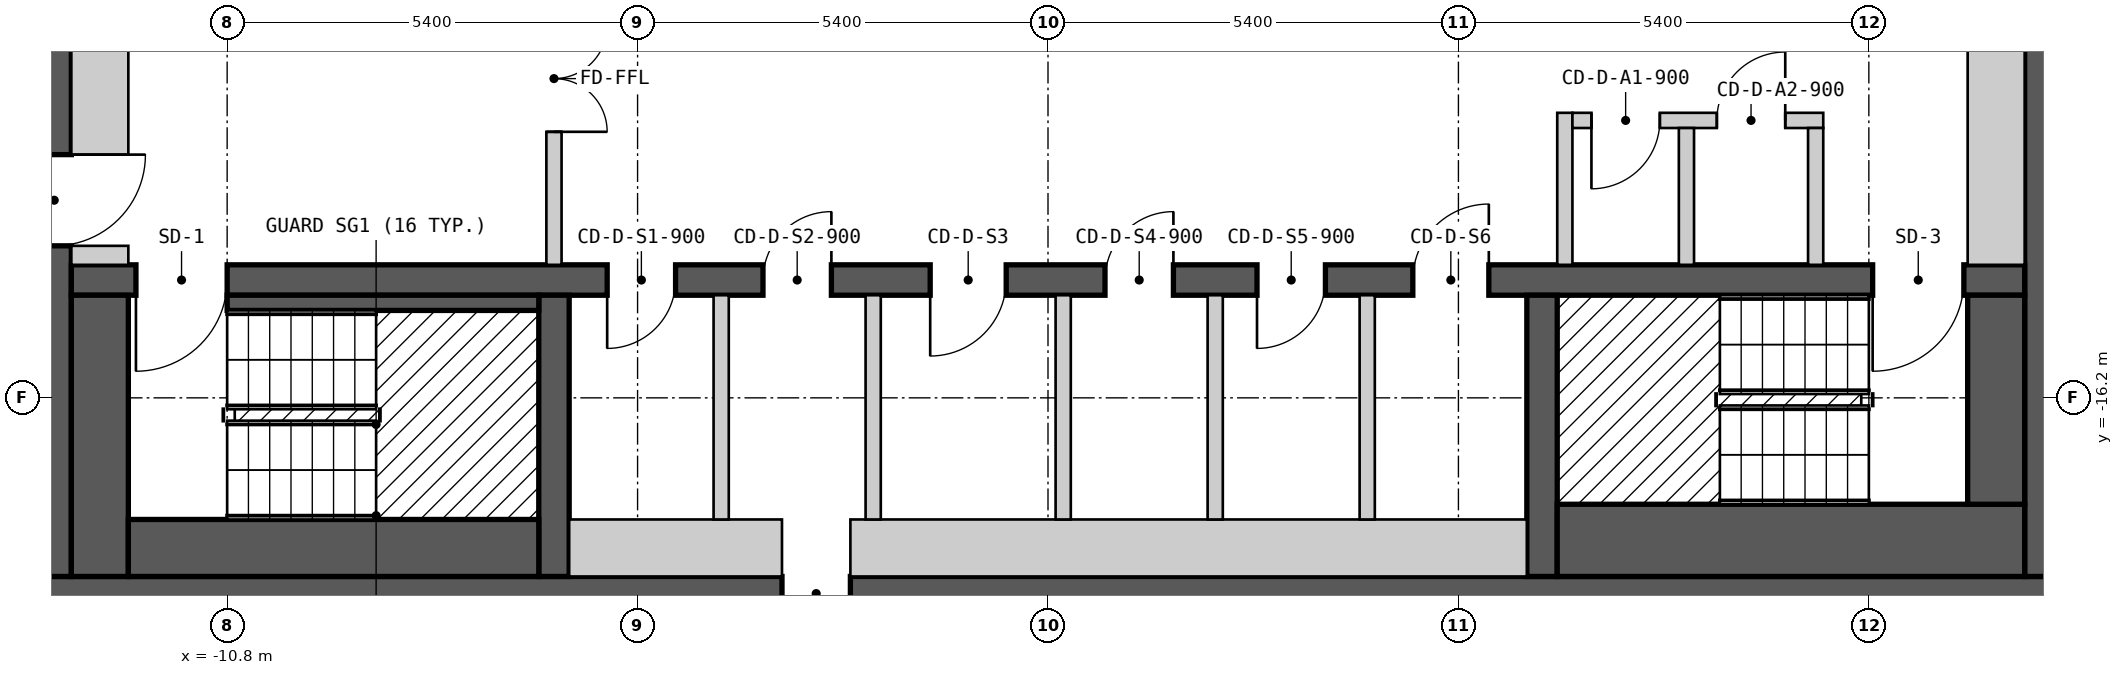
"""IFC4 building model, lengths in metres.
Left out: names, types, materials, properties, quantities, classifications, styles, units other than length and angle.
Written with IfcOpenShell. Run it as: python <this file> out.ifc"""

import sys

from ifc_helpers import new_model, si_unit, direction, frame, frame_2d, origin, place, context, subcontext, project, spatial, polyline, rectangle, outline, extrude, element, fill, save


model = new_model("IFC4")
c1 = context("Model", 3, precision=1e-05, world=origin(), true_north=direction((0.0, 1.0)))
c2 = subcontext(c1, "Body", "Model", "MODEL_VIEW")
j1 = project(units=[si_unit("LENGTHUNIT", "METRE"), si_unit("PLANEANGLEUNIT", "RADIAN")], contexts=[c1])
p1 = place(None, origin())
s1 = spatial("IfcSite", under=j1, at=p1, CompositionType="ELEMENT")
p2 = place(p1, origin())
s2 = spatial("IfcBuilding", under=s1, at=p2, CompositionType="ELEMENT")
p3 = place(p2, frame((0.0, 0.0, 229.8)))
s3 = spatial("IfcBuildingStorey", under=s2, at=p3, CompositionType="ELEMENT", Elevation=229.8)
p4 = place(p3, frame((-13.3, -18.775, 0.0), z_axis=(0.0, 0.0, 1.0), x_axis=(1.0, 0.0, 0.0)))
e1 = element("IfcWall", 1, at=p4, inside=s3, PredefinedType="SHEAR", context=c2, shape_type="SweptSolid", body=[
    extrude(rectangle(XDim=26.6, YDim=0.45, at=frame_2d((13.3, 0.0))), origin(), (0.0, 0.0, 1.0), 2.7),
])
p5 = place(p4, frame((9.8, 0.0, 0.0)))
e2 = element("IfcOpeningElement", 2, at=p5, cuts=e1, PredefinedType="OPENING", context=c2, shape_type="SweptSolid", body=[
    extrude(rectangle(XDim=0.9, YDim=2.1, at=frame_2d((0.45, 1.05))), frame((0.0, 0.235, 0.0), z_axis=(0.0, -1.0, 0.0), x_axis=(1.0, 0.0, 0.0)), (0.0, 0.0, 1.0), 0.47),
])
p6 = place(p3, frame((-13.075, -18.55, 0.0), z_axis=(0.0, 0.0, 1.0), x_axis=(0.0, 1.0, 0.0)))
e3 = element("IfcWall", 3, at=p6, inside=s3, PredefinedType="SHEAR", context=c2, shape_type="SweptSolid", body=[
    extrude(rectangle(XDim=13.1, YDim=0.45, at=frame_2d((6.55, 0.0))), origin(), (0.0, 0.0, 1.0), 2.7),
])
p7 = place(p6, frame((4.35, 0.0, 0.0)))
e4 = element("IfcOpeningElement", 4, at=p7, cuts=e3, PredefinedType="OPENING", context=c2, shape_type="SweptSolid", body=[
    extrude(rectangle(XDim=1.2, YDim=2.1, at=frame_2d((0.6, 1.05))), frame((0.0, 0.235, 0.0), z_axis=(0.0, -1.0, 0.0), x_axis=(1.0, 0.0, 0.0)), (0.0, 0.0, 1.0), 0.47),
])
p8 = place(p3, frame((13.075, -18.55, 0.0), z_axis=(0.0, 0.0, 1.0), x_axis=(0.0, 1.0, 0.0)))
e5 = element("IfcWall", 5, at=p8, inside=s3, PredefinedType="SHEAR", context=c2, shape_type="SweptSolid", body=[
    extrude(rectangle(XDim=13.1, YDim=0.45, at=frame_2d((6.55, 0.0))), origin(), (0.0, 0.0, 1.0), 2.7),
])
p9 = place(p3, frame((-12.85, -14.65, 0.0), z_axis=(0.0, 0.0, 1.0), x_axis=(1.0, 0.0, 0.0)))
e6 = element("IfcWall", 6, at=p9, inside=s3, PredefinedType="SHEAR", context=c2, shape_type="SweptSolid", body=[
    extrude(rectangle(XDim=25.7, YDim=0.4, at=frame_2d((12.85, 0.0))), origin(), (0.0, 0.0, 1.0), 2.7),
])
p10 = place(p9, frame((2.05, 0.0, 0.0), z_axis=(0.0, 0.0, 1.0), x_axis=(-1.0, 0.0, 0.0)))
e7 = element("IfcOpeningElement", 7, at=p10, cuts=e6, PredefinedType="OPENING", context=c2, shape_type="SweptSolid", body=[
    extrude(rectangle(XDim=1.2, YDim=2.1, at=frame_2d((0.6, 1.05))), frame((0.0, 0.21, 0.0), z_axis=(0.0, -1.0, 0.0), x_axis=(1.0, 0.0, 0.0)), (0.0, 0.0, 1.0), 0.42),
])
p11 = place(p9, frame((24.9, 0.0, 0.0), z_axis=(0.0, 0.0, 1.0), x_axis=(-1.0, 0.0, 0.0)))
e8 = element("IfcOpeningElement", 8, at=p11, cuts=e6, PredefinedType="OPENING", context=c2, shape_type="SweptSolid", body=[
    extrude(rectangle(XDim=1.2, YDim=2.1, at=frame_2d((0.6, 1.05))), frame((0.0, 0.21, 0.0), z_axis=(0.0, -1.0, 0.0), x_axis=(1.0, 0.0, 0.0)), (0.0, 0.0, 1.0), 0.42),
])
p12 = place(p9, frame((7.95, 0.0, 0.0), z_axis=(0.0, 0.0, 1.0), x_axis=(-1.0, 0.0, 0.0)))
e9 = element("IfcOpeningElement", 9, at=p12, cuts=e6, PredefinedType="OPENING", context=c2, shape_type="SweptSolid", body=[
    extrude(rectangle(XDim=0.9, YDim=2.1, at=frame_2d((0.45, 1.05))), frame((0.0, 0.21, 0.0), z_axis=(0.0, -1.0, 0.0), x_axis=(1.0, 0.0, 0.0)), (0.0, 0.0, 1.0), 0.42),
])
p13 = place(p9, frame((10.0, 0.0, 0.0), z_axis=(0.0, 0.0, 1.0), x_axis=(-1.0, 0.0, 0.0)))
e10 = element("IfcOpeningElement", 10, at=p13, cuts=e6, PredefinedType="OPENING", context=c2, shape_type="SweptSolid", body=[
    extrude(rectangle(XDim=0.9, YDim=2.1, at=frame_2d((0.45, 1.05))), frame((0.0, 0.21, 0.0), z_axis=(0.0, -1.0, 0.0), x_axis=(1.0, 0.0, 0.0)), (0.0, 0.0, 1.0), 0.42),
])
p14 = place(p9, frame((12.3, 0.0, 0.0), z_axis=(0.0, 0.0, 1.0), x_axis=(-1.0, 0.0, 0.0)))
e11 = element("IfcOpeningElement", 11, at=p14, cuts=e6, PredefinedType="OPENING", context=c2, shape_type="SweptSolid", body=[
    extrude(rectangle(XDim=1.0, YDim=2.1, at=frame_2d((0.5, 1.05))), frame((0.0, 0.21, 0.0), z_axis=(0.0, -1.0, 0.0), x_axis=(1.0, 0.0, 0.0)), (0.0, 0.0, 1.0), 0.42),
])
p15 = place(p9, frame((14.5, 0.0, 0.0), z_axis=(0.0, 0.0, 1.0), x_axis=(-1.0, 0.0, 0.0)))
e12 = element("IfcOpeningElement", 12, at=p15, cuts=e6, PredefinedType="OPENING", context=c2, shape_type="SweptSolid", body=[
    extrude(rectangle(XDim=0.9, YDim=2.1, at=frame_2d((0.45, 1.05))), frame((0.0, 0.21, 0.0), z_axis=(0.0, -1.0, 0.0), x_axis=(1.0, 0.0, 0.0)), (0.0, 0.0, 1.0), 0.42),
])
p16 = place(p9, frame((16.5, 0.0, 0.0), z_axis=(0.0, 0.0, 1.0), x_axis=(-1.0, 0.0, 0.0)))
e13 = element("IfcOpeningElement", 13, at=p16, cuts=e6, PredefinedType="OPENING", context=c2, shape_type="SweptSolid", body=[
    extrude(rectangle(XDim=0.9, YDim=2.1, at=frame_2d((0.45, 1.05))), frame((0.0, 0.21, 0.0), z_axis=(0.0, -1.0, 0.0), x_axis=(1.0, 0.0, 0.0)), (0.0, 0.0, 1.0), 0.42),
])
p17 = place(p9, frame((18.65, 0.0, 0.0), z_axis=(0.0, 0.0, 1.0), x_axis=(-1.0, 0.0, 0.0)))
e14 = element("IfcOpeningElement", 14, at=p17, cuts=e6, PredefinedType="OPENING", context=c2, shape_type="SweptSolid", body=[
    extrude(rectangle(XDim=1.0, YDim=2.1, at=frame_2d((0.5, 1.05))), frame((0.0, 0.21, 0.0), z_axis=(0.0, -1.0, 0.0), x_axis=(1.0, 0.0, 0.0)), (0.0, 0.0, 1.0), 0.42),
])
for number, where, z_axis, x_axis in (
    (15, (-6.5, -18.55, 0.0), (0.0, 0.0, 1.0), (0.0, 1.0, 0.0)),
    (16, (6.5, -18.55, 0.0), (0.0, 0.0, 1.0), (0.0, 1.0, 0.0)),
):
    element("IfcWall", number, at=place(p3, frame(where, z_axis=z_axis, x_axis=x_axis)), inside=s3, PredefinedType="SHEAR", context=c2, shape_type="SweptSolid", body=[
        extrude(rectangle(XDim=3.7, YDim=0.4, at=frame_2d((1.85, 0.0))), origin(), (0.0, 0.0, 1.0), 2.7),
    ])
p18 = place(p3, frame((-15.34, -18.37, 0.0), z_axis=(0.0, 0.0, 1.0), x_axis=(0.866022959057, -0.500004234368, 0.0)))
e17 = element("IfcWall", 17, at=p18, inside=s3, PredefinedType="SOLIDWALL", context=c2, shape_type="SweptSolid", body=[
    extrude(outline(polyline([(0.0, -0.15), (5.0, -0.15), (4.92, 0.15), (0.08, 0.15), (0.0, -0.15)])), origin(), (0.0, 0.0, 1.0), 2.7),
])
p19 = place(p18, frame((0.65, 0.0, 0.15)))
e18 = element("IfcOpeningElement", 18, at=p19, cuts=e17, PredefinedType="OPENING", context=c2, shape_type="SweptSolid", body=[
    extrude(rectangle(XDim=1.2, YDim=2.1, at=frame_2d((0.6, 1.05))), frame((0.0, 0.16, 0.0), z_axis=(0.0, -1.0, 0.0), x_axis=(1.0, 0.0, 0.0)), (0.0, 0.0, 1.0), 0.32),
])
p20 = place(p3, frame((11.01, -20.87, 0.0), z_axis=(0.0, 0.0, 1.0), x_axis=(0.866022959057, 0.500004234368, 0.0)))
e19 = element("IfcWall", 19, at=p20, inside=s3, PredefinedType="SOLIDWALL", context=c2, shape_type="SweptSolid", body=[
    extrude(outline(polyline([(0.0, -0.15), (5.0, -0.15), (4.92, 0.15), (0.08, 0.15), (0.0, -0.15)])), origin(), (0.0, 0.0, 1.0), 2.7),
])
p21 = place(p20, frame((0.65, 0.0, 0.15)))
e20 = element("IfcOpeningElement", 20, at=p21, cuts=e19, PredefinedType="OPENING", context=c2, shape_type="SweptSolid", body=[
    extrude(rectangle(XDim=1.2, YDim=2.1, at=frame_2d((0.6, 1.05))), frame((0.0, 0.16, 0.0), z_axis=(0.0, -1.0, 0.0), x_axis=(1.0, 0.0, 0.0)), (0.0, 0.0, 1.0), 0.32),
])
p22 = place(p3, frame((-12.475, -18.55, 0.0), z_axis=(0.0, 0.0, 1.0), x_axis=(0.0, 1.0, 0.0)))
e21 = element("IfcWall", 21, at=p22, inside=s3, PredefinedType="SOLIDWALL", context=c2, shape_type="SweptSolid", body=[
    extrude(rectangle(XDim=3.7, YDim=0.75, at=frame_2d((1.85, 0.0))), origin(), (0.0, 0.0, 1.0), 2.7),
])
p23 = place(p3, frame((-12.85, -14.325, 0.0), z_axis=(0.0, 0.0, 1.0), x_axis=(1.0, 0.0, 0.0)))
e22 = element("IfcWall", 22, at=p23, inside=s3, PredefinedType="PARTITIONING", context=c2, shape_type="SweptSolid", body=[
    extrude(rectangle(XDim=0.75, YDim=0.25, at=frame_2d((0.375, 0.0))), origin(), (0.0, 0.0, 1.0), 2.7),
])
p24 = place(p3, frame((-12.475, -13.0, 0.0), z_axis=(0.0, 0.0, 1.0), x_axis=(0.0, 1.0, 0.0)))
e23 = element("IfcWall", 23, at=p24, inside=s3, PredefinedType="PARTITIONING", context=c2, shape_type="SweptSolid", body=[
    extrude(rectangle(XDim=3.45, YDim=0.75, at=frame_2d((1.725, 0.0))), origin(), (0.0, 0.0, 1.0), 2.7),
])
p25 = place(p3, frame((-12.1, -18.175, 0.0), z_axis=(0.0, 0.0, 1.0), x_axis=(1.0, 0.0, 0.0)))
e24 = element("IfcWall", 24, at=p25, inside=s3, PredefinedType="SOLIDWALL", context=c2, shape_type="SweptSolid", body=[
    extrude(rectangle(XDim=5.4, YDim=0.75, at=frame_2d((2.7, 0.0))), origin(), (0.0, 0.0, 1.0), 2.7),
])
p26 = place(p3, frame((-10.8, -14.95, 0.0), z_axis=(0.0, 0.0, 1.0), x_axis=(1.0, 0.0, 0.0)))
e25 = element("IfcWall", 25, at=p26, inside=s3, PredefinedType="SOLIDWALL", context=c2, shape_type="SweptSolid", body=[
    extrude(rectangle(XDim=4.1, YDim=0.2, at=frame_2d((2.05, 0.0))), origin(), (0.0, 0.0, 1.0), 2.7),
])
p27 = place(p3, frame((-6.5, -14.45, 0.0), z_axis=(0.0, 0.0, 1.0), x_axis=(0.0, 1.0, 0.0)))
e26 = element("IfcWall", 26, at=p27, inside=s3, PredefinedType="PARTITIONING", context=c2, shape_type="SweptSolid", body=[
    extrude(rectangle(XDim=4.9, YDim=0.2, at=frame_2d((2.45, 0.0))), origin(), (0.0, 0.0, 1.0), 2.7),
])
p28 = place(p27, frame((3.15, 0.0, 0.0), z_axis=(0.0, 0.0, 1.0), x_axis=(-1.0, 0.0, 0.0)))
e27 = element("IfcOpeningElement", 27, at=p28, cuts=e26, PredefinedType="OPENING", context=c2, shape_type="SweptSolid", body=[
    extrude(rectangle(XDim=1.4, YDim=2.1, at=frame_2d((0.7, 1.05))), frame((0.0, 0.11, 0.0), z_axis=(0.0, -1.0, 0.0), x_axis=(1.0, 0.0, 0.0)), (0.0, 0.0, 1.0), 0.22),
])
p29 = place(p3, frame((-6.3, -18.175, 0.0), z_axis=(0.0, 0.0, 1.0), x_axis=(1.0, 0.0, 0.0)))
e28 = element("IfcWall", 28, at=p29, inside=s3, PredefinedType="PARTITIONING", context=c2, shape_type="SweptSolid", body=[
    extrude(rectangle(XDim=2.8, YDim=0.75, at=frame_2d((1.4, 0.0))), origin(), (0.0, 0.0, 1.0), 2.7),
])
p30 = place(p3, frame((-4.3, -17.8, 0.0), z_axis=(0.0, 0.0, 1.0), x_axis=(0.0, 1.0, 0.0)))
e29 = element("IfcWall", 29, at=p30, inside=s3, PredefinedType="PARTITIONING", context=c2, shape_type="SweptSolid", body=[
    extrude(rectangle(XDim=2.95, YDim=0.2, at=frame_2d((1.475, 0.0))), origin(), (0.0, 0.0, 1.0), 2.7),
])
p31 = place(p3, frame((-2.6, -18.175, 0.0), z_axis=(0.0, 0.0, 1.0), x_axis=(1.0, 0.0, 0.0)))
e30 = element("IfcWall", 30, at=p31, inside=s3, PredefinedType="PARTITIONING", context=c2, shape_type="SweptSolid", body=[
    extrude(rectangle(XDim=8.9, YDim=0.75, at=frame_2d((4.45, 0.0))), origin(), (0.0, 0.0, 1.0), 2.7),
])
for number, where, z_axis, x_axis in (
    (31, (-2.3, -17.8, 0.0), (0.0, 0.0, 1.0), (0.0, 1.0, 0.0)),
    (32, (0.2, -17.8, 0.0), (0.0, 0.0, 1.0), (0.0, 1.0, 0.0)),
    (33, (2.2, -17.8, 0.0), (0.0, 0.0, 1.0), (0.0, 1.0, 0.0)),
    (34, (4.2, -17.8, 0.0), (0.0, 0.0, 1.0), (0.0, 1.0, 0.0)),
):
    element("IfcWall", number, at=place(p3, frame(where, z_axis=z_axis, x_axis=x_axis)), inside=s3, PredefinedType="PARTITIONING", context=c2, shape_type="SweptSolid", body=[
        extrude(rectangle(XDim=2.95, YDim=0.2, at=frame_2d((1.475, 0.0))), origin(), (0.0, 0.0, 1.0), 2.7),
    ])
p32 = place(p3, frame((6.7, -18.075, 0.0), z_axis=(0.0, 0.0, 1.0), x_axis=(1.0, 0.0, 0.0)))
e35 = element("IfcWall", 35, at=p32, inside=s3, PredefinedType="SOLIDWALL", context=c2, shape_type="SweptSolid", body=[
    extrude(rectangle(XDim=6.15, YDim=0.95, at=frame_2d((3.075, 0.0))), origin(), (0.0, 0.0, 1.0), 2.7),
])
p33 = place(p3, frame((6.8, -14.45, 0.0), z_axis=(0.0, 0.0, 1.0), x_axis=(0.0, 1.0, 0.0)))
e36 = element("IfcWall", 36, at=p33, inside=s3, PredefinedType="PARTITIONING", context=c2, shape_type="SweptSolid", body=[
    extrude(rectangle(XDim=2.0, YDim=0.2, at=frame_2d((1.0, 0.0))), origin(), (0.0, 0.0, 1.0), 2.7),
])
p34 = place(p3, frame((6.9, -12.55, 0.0), z_axis=(0.0, 0.0, 1.0), x_axis=(1.0, 0.0, 0.0)))
e37 = element("IfcWall", 37, at=p34, inside=s3, PredefinedType="PARTITIONING", context=c2, shape_type="SweptSolid", body=[
    extrude(rectangle(XDim=3.3, YDim=0.2, at=frame_2d((1.65, 0.0))), origin(), (0.0, 0.0, 1.0), 2.7),
])
p35 = place(p34, frame((1.15, 0.0, 0.0), z_axis=(0.0, 0.0, 1.0), x_axis=(-1.0, 0.0, 0.0)))
e38 = element("IfcOpeningElement", 38, at=p35, cuts=e37, PredefinedType="OPENING", context=c2, shape_type="SweptSolid", body=[
    extrude(rectangle(XDim=0.9, YDim=2.1, at=frame_2d((0.45, 1.05))), frame((0.0, 0.11, 0.0), z_axis=(0.0, -1.0, 0.0), x_axis=(1.0, 0.0, 0.0)), (0.0, 0.0, 1.0), 0.22),
])
p36 = place(p34, frame((2.8, 0.0, 0.0), z_axis=(0.0, 0.0, 1.0), x_axis=(-1.0, 0.0, 0.0)))
e39 = element("IfcOpeningElement", 39, at=p36, cuts=e37, PredefinedType="OPENING", context=c2, shape_type="SweptSolid", body=[
    extrude(rectangle(XDim=0.9, YDim=2.1, at=frame_2d((0.45, 1.05))), frame((0.0, 0.11, 0.0), z_axis=(0.0, -1.0, 0.0), x_axis=(1.0, 0.0, 0.0)), (0.0, 0.0, 1.0), 0.22),
])
for number, where, z_axis, x_axis in (
    (40, (8.4, -14.45, 0.0), (0.0, 0.0, 1.0), (0.0, 1.0, 0.0)),
    (41, (10.1, -14.45, 0.0), (0.0, 0.0, 1.0), (0.0, 1.0, 0.0)),
):
    element("IfcWall", number, at=place(p3, frame(where, z_axis=z_axis, x_axis=x_axis)), inside=s3, PredefinedType="PARTITIONING", context=c2, shape_type="SweptSolid", body=[
        extrude(rectangle(XDim=1.8, YDim=0.2, at=frame_2d((0.9, 0.0))), origin(), (0.0, 0.0, 1.0), 2.7),
    ])
p37 = place(p3, frame((12.475, -17.6, 0.0), z_axis=(0.0, 0.0, 1.0), x_axis=(0.0, 1.0, 0.0)))
e42 = element("IfcWall", 42, at=p37, inside=s3, PredefinedType="SOLIDWALL", context=c2, shape_type="SweptSolid", body=[
    extrude(rectangle(XDim=2.75, YDim=0.75, at=frame_2d((1.375, 0.0))), origin(), (0.0, 0.0, 1.0), 2.7),
])
p38 = place(p3, frame((12.475, -14.45, 0.0), z_axis=(0.0, 0.0, 1.0), x_axis=(0.0, 1.0, 0.0)))
e43 = element("IfcWall", 43, at=p38, inside=s3, PredefinedType="PARTITIONING", context=c2, shape_type="SweptSolid", body=[
    extrude(rectangle(XDim=8.25, YDim=0.75, at=frame_2d((4.125, 0.0))), origin(), (0.0, 0.0, 1.0), 2.7),
])
p39 = place(p10, origin())
e44 = element("IfcDoor", 44, at=p39, inside=s3, OperationType="SINGLE_SWING_RIGHT", PredefinedType="DOOR", context=c2, shape_type="SweptSolid", body=[
    extrude(rectangle(XDim=1.2, YDim=2.1, at=frame_2d((0.6, 1.05))), frame((0.0, 0.025, 0.0), z_axis=(0.0, -1.0, 0.0), x_axis=(1.0, 0.0, 0.0)), (0.0, 0.0, 1.0), 0.05),
])
fill(e7, e44)
p40 = place(p11, origin())
e45 = element("IfcDoor", 45, at=p40, inside=s3, OperationType="SINGLE_SWING_RIGHT", PredefinedType="DOOR", context=c2, shape_type="SweptSolid", body=[
    extrude(rectangle(XDim=1.2, YDim=2.1, at=frame_2d((0.6, 1.05))), frame((0.0, 0.025, 0.0), z_axis=(0.0, -1.0, 0.0), x_axis=(1.0, 0.0, 0.0)), (0.0, 0.0, 1.0), 0.05),
])
fill(e8, e45)
p41 = place(p7, origin())
e46 = element("IfcDoor", 46, at=p41, inside=s3, OperationType="SINGLE_SWING_RIGHT", PredefinedType="DOOR", context=c2, shape_type="SweptSolid", body=[
    extrude(rectangle(XDim=1.2, YDim=2.1, at=frame_2d((0.6, 1.05))), frame((0.0, 0.025, 0.0), z_axis=(0.0, -1.0, 0.0), x_axis=(1.0, 0.0, 0.0)), (0.0, 0.0, 1.0), 0.05),
])
fill(e4, e46)
p42 = place(p28, origin())
e47 = element("IfcDoor", 47, at=p42, inside=s3, OperationType="DOUBLE_DOOR_SINGLE_SWING", PredefinedType="DOOR", context=c2, shape_type="SweptSolid", body=[
    extrude(rectangle(XDim=1.4, YDim=2.1, at=frame_2d((0.7, 1.05))), frame((0.0, 0.025, 0.0), z_axis=(0.0, -1.0, 0.0), x_axis=(1.0, 0.0, 0.0)), (0.0, 0.0, 1.0), 0.05),
])
fill(e27, e47)
p43 = place(p35, origin())
e48 = element("IfcDoor", 48, at=p43, inside=s3, OperationType="SINGLE_SWING_RIGHT", PredefinedType="DOOR", context=c2, shape_type="SweptSolid", body=[
    extrude(rectangle(XDim=0.9, YDim=2.1, at=frame_2d((0.45, 1.05))), frame((0.0, 0.025, 0.0), z_axis=(0.0, -1.0, 0.0), x_axis=(1.0, 0.0, 0.0)), (0.0, 0.0, 1.0), 0.05),
])
fill(e38, e48)
p44 = place(p36, origin())
e49 = element("IfcDoor", 49, at=p44, inside=s3, OperationType="SINGLE_SWING_LEFT", PredefinedType="DOOR", context=c2, shape_type="SweptSolid", body=[
    extrude(rectangle(XDim=0.9, YDim=2.1, at=frame_2d((0.45, 1.05))), frame((0.0, 0.025, 0.0), z_axis=(0.0, -1.0, 0.0), x_axis=(1.0, 0.0, 0.0)), (0.0, 0.0, 1.0), 0.05),
])
fill(e39, e49)
p45 = place(p12, origin())
e50 = element("IfcDoor", 50, at=p45, inside=s3, OperationType="SINGLE_SWING_RIGHT", PredefinedType="DOOR", context=c2, shape_type="SweptSolid", body=[
    extrude(rectangle(XDim=0.9, YDim=2.1, at=frame_2d((0.45, 1.05))), frame((0.0, 0.025, 0.0), z_axis=(0.0, -1.0, 0.0), x_axis=(1.0, 0.0, 0.0)), (0.0, 0.0, 1.0), 0.05),
])
fill(e9, e50)
p46 = place(p13, origin())
e51 = element("IfcDoor", 51, at=p46, inside=s3, OperationType="SINGLE_SWING_LEFT", PredefinedType="DOOR", context=c2, shape_type="SweptSolid", body=[
    extrude(rectangle(XDim=0.9, YDim=2.1, at=frame_2d((0.45, 1.05))), frame((0.0, 0.025, 0.0), z_axis=(0.0, -1.0, 0.0), x_axis=(1.0, 0.0, 0.0)), (0.0, 0.0, 1.0), 0.05),
])
fill(e10, e51)
p47 = place(p14, origin())
e52 = element("IfcDoor", 52, at=p47, inside=s3, OperationType="SINGLE_SWING_RIGHT", PredefinedType="DOOR", context=c2, shape_type="SweptSolid", body=[
    extrude(rectangle(XDim=1.0, YDim=2.1, at=frame_2d((0.5, 1.05))), frame((0.0, 0.025, 0.0), z_axis=(0.0, -1.0, 0.0), x_axis=(1.0, 0.0, 0.0)), (0.0, 0.0, 1.0), 0.05),
])
fill(e11, e52)
p48 = place(p15, origin())
e53 = element("IfcDoor", 53, at=p48, inside=s3, OperationType="SINGLE_SWING_LEFT", PredefinedType="DOOR", context=c2, shape_type="SweptSolid", body=[
    extrude(rectangle(XDim=0.9, YDim=2.1, at=frame_2d((0.45, 1.05))), frame((0.0, 0.025, 0.0), z_axis=(0.0, -1.0, 0.0), x_axis=(1.0, 0.0, 0.0)), (0.0, 0.0, 1.0), 0.05),
])
fill(e12, e53)
p49 = place(p16, origin())
e54 = element("IfcDoor", 54, at=p49, inside=s3, OperationType="SINGLE_SWING_RIGHT", PredefinedType="DOOR", context=c2, shape_type="SweptSolid", body=[
    extrude(rectangle(XDim=0.9, YDim=2.1, at=frame_2d((0.45, 1.05))), frame((0.0, 0.025, 0.0), z_axis=(0.0, -1.0, 0.0), x_axis=(1.0, 0.0, 0.0)), (0.0, 0.0, 1.0), 0.05),
])
fill(e13, e54)
p50 = place(p17, origin())
e55 = element("IfcDoor", 55, at=p50, inside=s3, OperationType="SINGLE_SWING_LEFT", PredefinedType="DOOR", context=c2, shape_type="SweptSolid", body=[
    extrude(rectangle(XDim=1.0, YDim=2.1, at=frame_2d((0.5, 1.05))), frame((0.0, 0.025, 0.0), z_axis=(0.0, -1.0, 0.0), x_axis=(1.0, 0.0, 0.0)), (0.0, 0.0, 1.0), 0.05),
])
fill(e14, e55)
p51 = place(p5, origin())
e56 = element("IfcDoor", 56, at=p51, inside=s3, OperationType="SINGLE_SWING_RIGHT", PredefinedType="DOOR", context=c2, shape_type="SweptSolid", body=[
    extrude(rectangle(XDim=0.9, YDim=2.1, at=frame_2d((0.45, 1.05))), frame((0.0, 0.025, 0.0), z_axis=(0.0, -1.0, 0.0), x_axis=(1.0, 0.0, 0.0)), (0.0, 0.0, 1.0), 0.05),
])
fill(e2, e56)
save(model, sys.argv[1])
